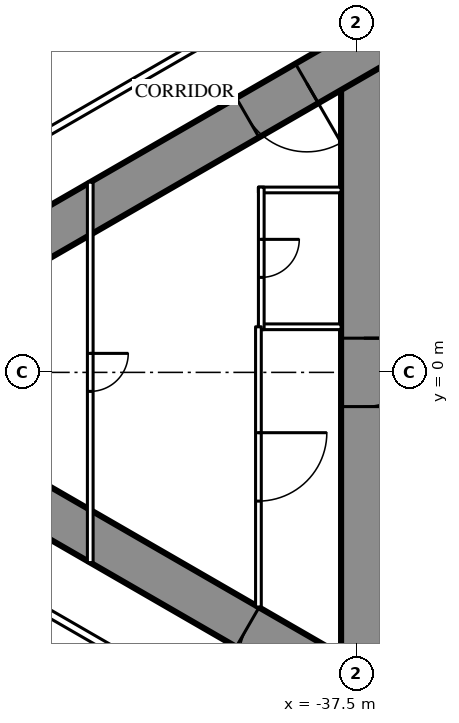
"""IFC4 building model, lengths in metres.
Left out: names, types, materials, properties, quantities, classifications, styles, units other than length and angle.
Written with IfcOpenShell. Run it as: python <this file> out.ifc"""

import sys

from ifc_helpers import new_model, si_unit, direction, frame, frame_2d, origin, place, context, subcontext, project, spatial, rectangle, extrude, element, fill, save


model = new_model("IFC4")
c1 = context("Model", 3, precision=1e-05, world=origin(), true_north=direction((0.0, 1.0)))
c2 = subcontext(c1, "Body", "Model", "MODEL_VIEW")
j1 = project(units=[si_unit("LENGTHUNIT", "METRE"), si_unit("PLANEANGLEUNIT", "RADIAN")], contexts=[c1])
p1 = place(None, origin())
s1 = spatial("IfcSite", under=j1, at=p1, CompositionType="ELEMENT")
p2 = place(p1, origin())
s2 = spatial("IfcBuilding", under=s1, at=p2, CompositionType="ELEMENT")
p3 = place(p2, frame((0.0, 0.0, 101.1)))
s3 = spatial("IfcBuildingStorey", under=s2, at=p3, CompositionType="ELEMENT", Elevation=101.1)
p4 = place(p3, frame((-37.3, 8.6, 0.0), z_axis=(0.0, 0.0, 1.0), x_axis=(0.0, -1.0, 0.0)))
e1 = element("IfcWall", 1, at=p4, inside=s3, PredefinedType="SHEAR", context=c2, shape_type="SweptSolid", body=[
    extrude(rectangle(XDim=17.2, YDim=1.2, at=frame_2d((8.6, 0.0))), origin(), (0.0, 0.0, 1.0), 3.5),
])
p5 = place(p4, frame((7.7, 0.0, 0.0)))
e2 = element("IfcOpeningElement", 2, at=p5, cuts=e1, PredefinedType="OPENING", context=c2, shape_type="SweptSolid", body=[
    extrude(rectangle(XDim=1.8, YDim=2.2, at=frame_2d((0.9, 1.1))), frame((0.0, 0.61, 0.0), z_axis=(0.0, -1.0, 0.0), x_axis=(1.0, 0.0, 0.0)), (0.0, 0.0, 1.0), 1.22),
])
p6 = place(p3, frame((-27.2, 14.3, 0.0), z_axis=(0.0, 0.0, 1.0), x_axis=(-0.866026593062, -0.499997940104, 0.0)))
e3 = element("IfcWall", 3, at=p6, inside=s3, PredefinedType="SHEAR", context=c2, shape_type="SweptSolid", body=[
    extrude(rectangle(XDim=28.946, YDim=1.2, at=frame_2d((14.473, 0.0))), origin(), (0.0, 0.0, 1.0), 3.5),
])
p7 = place(p6, frame((4.6, 0.0, 0.0)))
e4 = element("IfcOpeningElement", 4, at=p7, cuts=e3, PredefinedType="OPENING", context=c2, shape_type="SweptSolid", body=[
    extrude(rectangle(XDim=1.0, YDim=2.2, at=frame_2d((0.5, 1.1))), frame((0.0, 0.61, 0.0), z_axis=(0.0, -1.0, 0.0), x_axis=(1.0, 0.0, 0.0)), (0.0, 0.0, 1.0), 1.22),
])
p8 = place(p6, frame((13.395, 0.0, 0.0)))
e5 = element("IfcOpeningElement", 5, at=p8, cuts=e3, PredefinedType="OPENING", context=c2, shape_type="SweptSolid", body=[
    extrude(rectangle(XDim=1.8, YDim=2.2, at=frame_2d((0.9, 1.1))), frame((0.0, 0.61, 0.0), z_axis=(0.0, -1.0, 0.0), x_axis=(1.0, 0.0, 0.0)), (0.0, 0.0, 1.0), 1.22),
])
p9 = place(p3, frame((-27.2, -14.3, 0.0), z_axis=(0.0, 0.0, 1.0), x_axis=(-0.866024021859, 0.500002393557, 0.0)))
e6 = element("IfcWall", 6, at=p9, inside=s3, PredefinedType="SHEAR", context=c2, shape_type="SweptSolid", body=[
    extrude(rectangle(XDim=27.907, YDim=1.2, at=frame_2d((13.954, 0.0))), origin(), (0.0, 0.0, 1.0), 3.5),
])
p10 = place(p9, frame((4.6, 0.0, 0.0)))
e7 = element("IfcOpeningElement", 7, at=p10, cuts=e6, PredefinedType="OPENING", context=c2, shape_type="SweptSolid", body=[
    extrude(rectangle(XDim=1.0, YDim=2.2, at=frame_2d((0.5, 1.1))), frame((0.0, 0.61, 0.0), z_axis=(0.0, -1.0, 0.0), x_axis=(1.0, 0.0, 0.0)), (0.0, 0.0, 1.0), 1.22),
])
p11 = place(p9, frame((13.395, 0.0, 0.0)))
e8 = element("IfcOpeningElement", 8, at=p11, cuts=e6, PredefinedType="OPENING", context=c2, shape_type="SweptSolid", body=[
    extrude(rectangle(XDim=1.8, YDim=2.2, at=frame_2d((0.9, 1.1))), frame((0.0, 0.61, 0.0), z_axis=(0.0, -1.0, 0.0), x_axis=(1.0, 0.0, 0.0)), (0.0, 0.0, 1.0), 1.22),
])
p12 = place(p3, frame((-36.92, -11.344, 0.0), z_axis=(0.0, 0.0, 1.0), x_axis=(-0.866028313256, 0.499994960614, 0.0)))
e9 = element("IfcWall", 9, at=p12, inside=s3, PredefinedType="PARTITIONING", context=c2, shape_type="SweptSolid", body=[
    extrude(rectangle(XDim=22.568, YDim=0.2, at=frame_2d((11.284, 0.0))), origin(), (0.0, 0.0, 1.0), 3.25),
])
p13 = place(p12, frame((21.018, 0.0, 0.0)))
e10 = element("IfcOpeningElement", 10, at=p13, cuts=e9, PredefinedType="OPENING", context=c2, shape_type="SweptSolid", body=[
    extrude(rectangle(XDim=0.95, YDim=2.2, at=frame_2d((0.475, 1.1))), frame((0.0, 0.11, 0.0), z_axis=(0.0, -1.0, 0.0), x_axis=(1.0, 0.0, 0.0)), (0.0, 0.0, 1.0), 0.22),
])
p14 = place(p12, frame((3.35, 0.0, 0.0)))
e11 = element("IfcOpeningElement", 11, at=p14, cuts=e9, PredefinedType="OPENING", context=c2, shape_type="SweptSolid", body=[
    extrude(rectangle(XDim=1.0, YDim=2.2, at=frame_2d((0.5, 1.1))), frame((0.0, 0.11, 0.0), z_axis=(0.0, -1.0, 0.0), x_axis=(1.0, 0.0, 0.0)), (0.0, 0.0, 1.0), 0.22),
])
p15 = place(p3, frame((-37.7, 10.894, 0.0), z_axis=(0.0, 0.0, 1.0), x_axis=(-0.866027551079, -0.499996280759, 0.0)))
e12 = element("IfcWall", 12, at=p15, inside=s3, PredefinedType="PARTITIONING", context=c2, shape_type="SweptSolid", body=[
    extrude(rectangle(XDim=10.831, YDim=0.2, at=frame_2d((5.415, 0.0))), origin(), (0.0, 0.0, 1.0), 3.25),
])
p16 = place(p15, frame((0.6, 0.0, 0.0)))
e13 = element("IfcOpeningElement", 13, at=p16, cuts=e12, PredefinedType="OPENING", context=c2, shape_type="SweptSolid", body=[
    extrude(rectangle(XDim=0.95, YDim=2.2, at=frame_2d((0.475, 1.1))), frame((0.0, 0.11, 0.0), z_axis=(0.0, -1.0, 0.0), x_axis=(1.0, 0.0, 0.0)), (0.0, 0.0, 1.0), 0.22),
])
for number, where, z_axis, x_axis in (
    (14, (-37.9, 1.2, 0.0), (0.0, 0.0, 1.0), (-1.0, 0.0, 0.0)),
    (15, (-37.9, 4.8, 0.0), (0.0, 0.0, 1.0), (-1.0, 0.0, 0.0)),
):
    element("IfcWall", number, at=place(p3, frame(where, z_axis=z_axis, x_axis=x_axis)), inside=s3, PredefinedType="PARTITIONING", context=c2, shape_type="SweptSolid", body=[
        extrude(rectangle(XDim=2.175, YDim=0.15, at=frame_2d((1.087, 0.0))), origin(), (0.0, 0.0, 1.0), 3.25),
    ])
p17 = place(p3, frame((-40.0, 4.875, 0.0), z_axis=(0.0, 0.0, 1.0), x_axis=(0.0, -1.0, 0.0)))
e16 = element("IfcWall", 16, at=p17, inside=s3, PredefinedType="PARTITIONING", context=c2, shape_type="SweptSolid", body=[
    extrude(rectangle(XDim=3.75, YDim=0.15, at=frame_2d((1.875, 0.0))), origin(), (0.0, 0.0, 1.0), 3.25),
])
p18 = place(p17, frame((1.375, 0.0, 0.0)))
e17 = element("IfcOpeningElement", 17, at=p18, cuts=e16, PredefinedType="OPENING", context=c2, shape_type="SweptSolid", body=[
    extrude(rectangle(XDim=1.0, YDim=2.2, at=frame_2d((0.5, 1.1))), frame((0.0, 0.085, 0.0), z_axis=(0.0, -1.0, 0.0), x_axis=(1.0, 0.0, 0.0)), (0.0, 0.0, 1.0), 0.17),
])
p19 = place(p3, frame((-40.075, 1.2, 0.0), z_axis=(0.0, 0.0, 1.0), x_axis=(0.0, -1.0, 0.0)))
e18 = element("IfcWall", 18, at=p19, inside=s3, PredefinedType="PARTITIONING", context=c2, shape_type="SweptSolid", body=[
    extrude(rectangle(XDim=7.374, YDim=0.15, at=frame_2d((3.687, 0.0))), origin(), (0.0, 0.0, 1.0), 3.25),
])
p20 = place(p19, frame((2.787, 0.0, 0.0)))
e19 = element("IfcOpeningElement", 19, at=p20, cuts=e18, PredefinedType="OPENING", context=c2, shape_type="SweptSolid", body=[
    extrude(rectangle(XDim=1.8, YDim=2.2, at=frame_2d((0.9, 1.1))), frame((0.0, 0.085, 0.0), z_axis=(0.0, -1.0, 0.0), x_axis=(1.0, 0.0, 0.0)), (0.0, 0.0, 1.0), 0.17),
])
p21 = place(p3, frame((-44.5, 5.005, 0.0), z_axis=(0.0, 0.0, 1.0), x_axis=(0.0, -1.0, 0.0)))
e20 = element("IfcWall", 20, at=p21, inside=s3, PredefinedType="PARTITIONING", context=c2, shape_type="SweptSolid", body=[
    extrude(rectangle(XDim=10.009, YDim=0.15, at=frame_2d((5.005, 0.0))), origin(), (0.0, 0.0, 1.0), 2.45),
])
p22 = place(p21, frame((4.505, 0.0, 0.0)))
e21 = element("IfcOpeningElement", 21, at=p22, cuts=e20, PredefinedType="OPENING", context=c2, shape_type="SweptSolid", body=[
    extrude(rectangle(XDim=1.0, YDim=2.2, at=frame_2d((0.5, 1.1))), frame((0.0, 0.085, 0.0), z_axis=(0.0, -1.0, 0.0), x_axis=(1.0, 0.0, 0.0)), (0.0, 0.0, 1.0), 0.17),
])
p23 = place(p18, origin())
e22 = element("IfcDoor", 22, at=p23, inside=s3, OperationType="SINGLE_SWING_LEFT", PredefinedType="DOOR", context=c2, shape_type="SweptSolid", body=[
    extrude(rectangle(XDim=1.0, YDim=2.2, at=frame_2d((0.5, 1.1))), frame((0.0, 0.025, 0.0), z_axis=(0.0, -1.0, 0.0), x_axis=(1.0, 0.0, 0.0)), (0.0, 0.0, 1.0), 0.05),
])
fill(e17, e22)
p24 = place(p20, origin())
e23 = element("IfcDoor", 23, at=p24, inside=s3, OperationType="DOUBLE_DOOR_SINGLE_SWING", PredefinedType="DOOR", context=c2, shape_type="SweptSolid", body=[
    extrude(rectangle(XDim=1.8, YDim=2.2, at=frame_2d((0.9, 1.1))), frame((0.0, 0.025, 0.0), z_axis=(0.0, -1.0, 0.0), x_axis=(1.0, 0.0, 0.0)), (0.0, 0.0, 1.0), 0.05),
])
fill(e19, e23)
p25 = place(p22, origin())
e24 = element("IfcDoor", 24, at=p25, inside=s3, OperationType="SINGLE_SWING_LEFT", PredefinedType="DOOR", context=c2, shape_type="SweptSolid", body=[
    extrude(rectangle(XDim=1.0, YDim=2.2, at=frame_2d((0.5, 1.1))), frame((0.0, 0.025, 0.0), z_axis=(0.0, -1.0, 0.0), x_axis=(1.0, 0.0, 0.0)), (0.0, 0.0, 1.0), 0.05),
])
fill(e21, e24)
p26 = place(p8, origin())
e25 = element("IfcDoor", 25, at=p26, inside=s3, OperationType="DOUBLE_DOOR_SINGLE_SWING", PredefinedType="DOOR", context=c2, shape_type="SweptSolid", body=[
    extrude(rectangle(XDim=1.8, YDim=2.2, at=frame_2d((0.9, 1.1))), frame((0.0, 0.025, 0.0), z_axis=(0.0, -1.0, 0.0), x_axis=(1.0, 0.0, 0.0)), (0.0, 0.0, 1.0), 0.05),
])
fill(e5, e25)
p27 = place(p11, origin())
e26 = element("IfcDoor", 26, at=p27, inside=s3, OperationType="DOUBLE_DOOR_SINGLE_SWING", PredefinedType="DOOR", context=c2, shape_type="SweptSolid", body=[
    extrude(rectangle(XDim=1.8, YDim=2.2, at=frame_2d((0.9, 1.1))), frame((0.0, 0.025, 0.0), z_axis=(0.0, -1.0, 0.0), x_axis=(1.0, 0.0, 0.0)), (0.0, 0.0, 1.0), 0.05),
])
fill(e8, e26)
p28 = place(p5, origin())
e27 = element("IfcDoor", 27, at=p28, inside=s3, OperationType="DOUBLE_DOOR_SINGLE_SWING", PredefinedType="DOOR", context=c2, shape_type="SweptSolid", body=[
    extrude(rectangle(XDim=1.8, YDim=2.2, at=frame_2d((0.9, 1.1))), frame((0.0, 0.025, 0.0), z_axis=(0.0, -1.0, 0.0), x_axis=(1.0, 0.0, 0.0)), (0.0, 0.0, 1.0), 0.05),
])
fill(e2, e27)
save(model, sys.argv[1])
